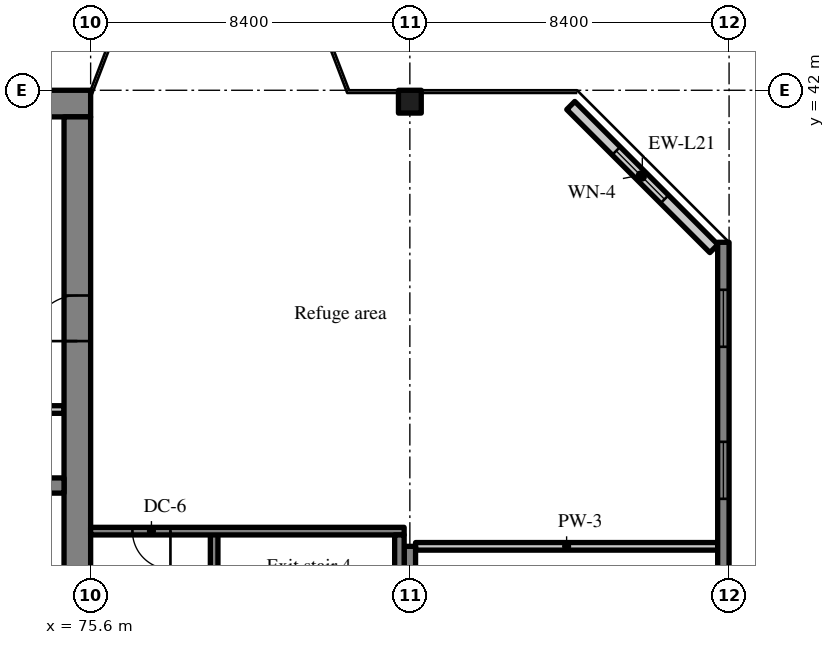
"""IFC4 building model, lengths in metres.
Left out: names, types, materials, properties, quantities, classifications, styles, units other than length and angle.
Written with IfcOpenShell. Run it as: python <this file> out.ifc"""

import sys

from ifc_helpers import new_model, si_unit, direction, frame, frame_2d, origin, origin_2d, place, context, subcontext, project, spatial, rectangle, extrude, source, transform, mapped, element, fill, save


model = new_model("IFC4")
c1 = context("Model", 3, precision=1e-05, world=origin(), true_north=direction((0.0, 1.0)))
c2 = subcontext(c1, "Body", "Model", "MODEL_VIEW")
j1 = project(units=[si_unit("LENGTHUNIT", "METRE"), si_unit("PLANEANGLEUNIT", "RADIAN")], contexts=[c1])
p1 = place(None, origin())
s1 = spatial("IfcSite", under=j1, at=p1, CompositionType="ELEMENT")
p2 = place(p1, origin())
s2 = spatial("IfcBuilding", under=s1, at=p2, CompositionType="ELEMENT")
p3 = place(p2, frame((0.0, 0.0, 155.4)))
s3 = spatial("IfcBuildingStorey", under=s2, at=p3, CompositionType="ELEMENT", Elevation=155.4)
m1 = source(origin(), c2, "Body", "SweptSolid", [
    extrude(rectangle(XDim=50.4, YDim=0.7, at=frame_2d((25.2, 0.0))), origin(), (0.0, 0.0, 1.0), 3.52),
])
p4 = place(p3, frame((25.2, 41.65, 0.0), z_axis=(0.0, 0.0, 1.0), x_axis=(1.0, 0.0, 0.0)))
e1 = element("IfcWall", 1, at=p4, inside=s3, PredefinedType="SHEAR", context=c2, shape_type="MappedRepresentation", body=[
    mapped(m1, transform((0.0, 0.0, 0.0), scale=1.0)),
])
m2 = source(origin(), c2, "Body", "SweptSolid", [
    extrude(rectangle(XDim=18.6, YDim=0.7, at=frame_2d((9.3, 0.0))), origin(), (0.0, 0.0, 1.0), 3.52),
])
p5 = place(p3, frame((75.25, 22.7, 0.0), z_axis=(0.0, 0.0, 1.0), x_axis=(0.0, 1.0, 0.0)))
e2 = element("IfcWall", 2, at=p5, inside=s3, PredefinedType="SHEAR", context=c2, shape_type="MappedRepresentation", body=[
    mapped(m2, transform((0.0, 0.0, 0.0), scale=1.0)),
])
m3 = source(origin(), c2, "Body", "SweptSolid", [
    extrude(rectangle(XDim=1.0, YDim=2.1, at=frame_2d((0.5, 1.05))), frame((0.0, 0.36, 0.0), z_axis=(0.0, -1.0, 0.0), x_axis=(1.0, 0.0, 0.0)), (0.0, 0.0, 1.0), 0.72),
])
p6 = place(p5, frame((2.8, 0.0, 0.0)))
e3 = element("IfcOpeningElement", 3, at=p6, cuts=e2, PredefinedType="OPENING", context=c2, shape_type="MappedRepresentation", body=[
    mapped(m3, transform((0.0, 0.0, 0.0), scale=1.0)),
])
m4 = source(origin(), c2, "Body", "SweptSolid", [
    extrude(rectangle(XDim=1.2, YDim=2.1, at=frame_2d((0.6, 1.05))), frame((0.0, 0.36, 0.0), z_axis=(0.0, -1.0, 0.0), x_axis=(1.0, 0.0, 0.0)), (0.0, 0.0, 1.0), 0.72),
])
p7 = place(p5, frame((12.7, 0.0, 0.0)))
e4 = element("IfcOpeningElement", 4, at=p7, cuts=e2, PredefinedType="OPENING", context=c2, shape_type="MappedRepresentation", body=[
    mapped(m4, transform((0.0, 0.0, 0.0), scale=1.0)),
])
m5 = source(origin(), c2, "Body", "SweptSolid", [
    extrude(rectangle(XDim=7.5, YDim=0.4, at=frame_2d((3.75, 0.0))), origin(), (0.0, 0.0, 1.0), 3.52),
])
p8 = place(p3, frame((67.4, 31.6, 0.0), z_axis=(0.0, 0.0, 1.0), x_axis=(1.0, 0.0, 0.0)))
e5 = element("IfcWall", 5, at=p8, inside=s3, PredefinedType="SHEAR", context=c2, shape_type="MappedRepresentation", body=[
    mapped(m5, transform((0.0, 0.0, 0.0), scale=1.0)),
])
m6 = source(origin(), c2, "Body", "SweptSolid", [
    extrude(rectangle(XDim=1.1, YDim=2.1, at=frame_2d((0.55, 1.05))), frame((0.0, 0.21, 0.0), z_axis=(0.0, -1.0, 0.0), x_axis=(1.0, 0.0, 0.0)), (0.0, 0.0, 1.0), 0.42),
])
p9 = place(p8, frame((5.725, 0.0, 0.0)))
e6 = element("IfcOpeningElement", 6, at=p9, cuts=e5, PredefinedType="OPENING", context=c2, shape_type="MappedRepresentation", body=[
    mapped(m6, transform((0.0, 0.0, 0.0), scale=1.0)),
])
m7 = source(origin(), c2, "Body", "SweptSolid", [
    extrude(rectangle(XDim=8.0, YDim=0.3, at=frame_2d((4.0, 0.0))), origin(), (0.0, 0.0, 1.0), 3.52),
])
p10 = place(p3, frame((84.0, 22.0, 0.0), z_axis=(0.0, 0.0, 1.0), x_axis=(0.0, 1.0, 0.0)))
e7 = element("IfcWall", 7, at=p10, inside=s3, PredefinedType="SHEAR", context=c2, shape_type="MappedRepresentation", body=[
    mapped(m7, transform((0.0, 0.0, 0.0), scale=1.0)),
])
m8 = source(origin(), c2, "Body", "SweptSolid", [
    extrude(rectangle(XDim=16.0, YDim=0.3, at=frame_2d((8.0, 0.0))), origin(), (0.0, 0.0, 1.0), 3.52),
])
p11 = place(p3, frame((92.25, 22.0, 0.0), z_axis=(0.0, 0.0, 1.0), x_axis=(0.0, 1.0, 0.0)))
e8 = element("IfcWall", 8, at=p11, inside=s3, PredefinedType="SHEAR", context=c2, shape_type="MappedRepresentation", body=[
    mapped(m8, transform((0.0, 0.0, 0.0), scale=1.0)),
])
m9 = source(origin(), c2, "Body", "SweptSolid", [
    extrude(rectangle(XDim=1.5, YDim=1.5, at=frame_2d((0.75, 0.75))), frame((0.0, 0.16, 0.0), z_axis=(0.0, -1.0, 0.0), x_axis=(1.0, 0.0, 0.0)), (0.0, 0.0, 1.0), 0.32),
])
p12 = place(p11, frame((1.25, 0.0, 0.9)))
e9 = element("IfcOpeningElement", 9, at=p12, cuts=e8, PredefinedType="OPENING", context=c2, shape_type="MappedRepresentation", body=[
    mapped(m9, transform((0.0, 0.0, 0.0), scale=1.0)),
])
p13 = place(p11, frame((5.25, 0.0, 0.9)))
e10 = element("IfcOpeningElement", 10, at=p13, cuts=e8, PredefinedType="OPENING", context=c2, shape_type="MappedRepresentation", body=[
    mapped(m9, transform((0.0, 0.0, 0.0), scale=1.0)),
])
p14 = place(p11, frame((9.25, 0.0, 0.9)))
e11 = element("IfcOpeningElement", 11, at=p14, cuts=e8, PredefinedType="OPENING", context=c2, shape_type="MappedRepresentation", body=[
    mapped(m9, transform((0.0, 0.0, 0.0), scale=1.0)),
])
p15 = place(p11, frame((13.25, 0.0, 0.9)))
e12 = element("IfcOpeningElement", 12, at=p15, cuts=e8, PredefinedType="OPENING", context=c2, shape_type="MappedRepresentation", body=[
    mapped(m9, transform((0.0, 0.0, 0.0), scale=1.0)),
])
m10 = source(origin(), c2, "Body", "SweptSolid", [
    extrude(rectangle(XDim=0.6, YDim=0.6, at=origin_2d()), origin(), (0.0, 0.0, 1.0), 3.52),
])
p16 = place(p3, frame((84.0, 41.7, 0.0), z_axis=(0.0, 0.0, 1.0), x_axis=(1.0, 0.0, 0.0)))
e13 = element("IfcColumn", 13, at=p16, inside=s3, PredefinedType="COLUMN", context=c2, shape_type="MappedRepresentation", body=[
    mapped(m10, transform((0.0, 0.0, 0.0), scale=1.0)),
])
m11 = source(origin(), c2, "Body", "SweptSolid", [
    extrude(rectangle(XDim=5.326, YDim=0.3, at=frame_2d((2.663, 0.0))), origin(), (0.0, 0.0, 1.0), 3.52),
])
p17 = place(p3, frame((92.0, 37.834, 0.0), z_axis=(0.0, 0.0, 1.0), x_axis=(-0.707083859269, 0.707129702361, 0.0)))
e14 = element("IfcWall", 14, at=p17, inside=s3, PredefinedType="SOLIDWALL", context=c2, shape_type="MappedRepresentation", body=[
    mapped(m11, transform((0.0, 0.0, 0.0), scale=1.0)),
])
m12 = source(origin(), c2, "Body", "SweptSolid", [
    extrude(rectangle(XDim=1.8, YDim=1.5, at=frame_2d((0.9, 0.75))), frame((0.0, 0.16, 0.0), z_axis=(0.0, -1.0, 0.0), x_axis=(1.0, 0.0, 0.0)), (0.0, 0.0, 1.0), 0.32),
])
p18 = place(p17, frame((1.836, 0.0, 0.9)))
e15 = element("IfcOpeningElement", 15, at=p18, cuts=e14, PredefinedType="OPENING", context=c2, shape_type="MappedRepresentation", body=[
    mapped(m12, transform((0.0, 0.0, 0.0), scale=1.0)),
])
m13 = source(origin(), c2, "Body", "SweptSolid", [
    extrude(rectangle(XDim=2.45, YDim=0.2, at=frame_2d((1.225, 0.0))), origin(), (0.0, 0.0, 1.0), 3.52),
])
p19 = place(p3, frame((72.45, 33.6, 0.0), z_axis=(0.0, 0.0, 1.0), x_axis=(1.0, 0.0, 0.0)))
e16 = element("IfcWall", 16, at=p19, inside=s3, PredefinedType="SOLIDWALL", context=c2, shape_type="MappedRepresentation", body=[
    mapped(m13, transform((0.0, 0.0, 0.0), scale=1.0)),
])
m14 = source(origin(), c2, "Body", "SweptSolid", [
    extrude(rectangle(XDim=8.3, YDim=0.2, at=frame_2d((4.15, 0.0))), origin(), (0.0, 0.0, 1.0), 3.52),
])
p20 = place(p3, frame((78.85, 22.1, 0.0), z_axis=(0.0, 0.0, 1.0), x_axis=(0.0, 1.0, 0.0)))
e17 = element("IfcWall", 17, at=p20, inside=s3, PredefinedType="SOLIDWALL", context=c2, shape_type="MappedRepresentation", body=[
    mapped(m14, transform((0.0, 0.0, 0.0), scale=1.0)),
])
m15 = source(origin(), c2, "Body", "SweptSolid", [
    extrude(rectangle(XDim=1.2, YDim=2.1, at=frame_2d((0.6, 1.05))), frame((0.0, 0.11, 0.0), z_axis=(0.0, -1.0, 0.0), x_axis=(1.0, 0.0, 0.0)), (0.0, 0.0, 1.0), 0.22),
])
p21 = place(p20, frame((0.6, 0.0, 0.0)))
e18 = element("IfcOpeningElement", 18, at=p21, cuts=e17, PredefinedType="OPENING", context=c2, shape_type="MappedRepresentation", body=[
    mapped(m15, transform((0.0, 0.0, 0.0), scale=1.0)),
])
m16 = source(origin(), c2, "Body", "SweptSolid", [
    extrude(rectangle(XDim=8.25, YDim=0.2, at=frame_2d((4.125, 0.0))), origin(), (0.0, 0.0, 1.0), 3.52),
])
p22 = place(p3, frame((83.85, 30.4, 0.0), z_axis=(0.0, 0.0, 1.0), x_axis=(-1.0, 0.0, 0.0)))
e19 = element("IfcWall", 19, at=p22, inside=s3, PredefinedType="SOLIDWALL", context=c2, shape_type="MappedRepresentation", body=[
    mapped(m16, transform((0.0, 0.0, 0.0), scale=1.0)),
])
m17 = source(origin(), c2, "Body", "SweptSolid", [
    extrude(rectangle(XDim=1.0, YDim=2.1, at=frame_2d((0.5, 1.05))), frame((0.0, 0.11, 0.0), z_axis=(0.0, -1.0, 0.0), x_axis=(1.0, 0.0, 0.0)), (0.0, 0.0, 1.0), 0.22),
])
p23 = place(p22, frame((6.15, 0.0, 0.0)))
e20 = element("IfcOpeningElement", 20, at=p23, cuts=e19, PredefinedType="OPENING", context=c2, shape_type="MappedRepresentation", body=[
    mapped(m17, transform((0.0, 0.0, 0.0), scale=1.0)),
])
m18 = source(origin(), c2, "Body", "SweptSolid", [
    extrude(rectangle(XDim=8.1, YDim=0.25, at=frame_2d((4.05, 0.0))), origin(), (0.0, 0.0, 1.0), 3.52),
])
p24 = place(p3, frame((83.725, 22.2, 0.0), z_axis=(0.0, 0.0, 1.0), x_axis=(0.0, 1.0, 0.0)))
e21 = element("IfcWall", 21, at=p24, inside=s3, PredefinedType="SOLIDWALL", context=c2, shape_type="MappedRepresentation", body=[
    mapped(m18, transform((0.0, 0.0, 0.0), scale=1.0)),
])
m19 = source(origin(), c2, "Body", "SweptSolid", [
    extrude(rectangle(XDim=7.95, YDim=0.2, at=frame_2d((3.975, 0.0))), origin(), (0.0, 0.0, 1.0), 3.52),
])
p25 = place(p3, frame((84.15, 30.0, 0.0), z_axis=(0.0, 0.0, 1.0), x_axis=(1.0, 0.0, 0.0)))
e22 = element("IfcWall", 22, at=p25, inside=s3, PredefinedType="PARTITIONING", context=c2, shape_type="MappedRepresentation", body=[
    mapped(m19, transform((0.0, 0.0, 0.0), scale=1.0)),
])
m20 = source(origin(), c2, "Body", "SweptSolid", [
    extrude(rectangle(XDim=1.8, YDim=1.5, at=frame_2d((0.9, 0.75))), frame((0.0, 0.03, 0.0), z_axis=(0.0, -1.0, 0.0), x_axis=(1.0, 0.0, 0.0)), (0.0, 0.0, 1.0), 0.06),
])
p26 = place(p18, origin())
e23 = element("IfcWindow", 23, at=p26, inside=s3, PartitioningType="SINGLE_PANEL", PredefinedType="WINDOW", context=c2, shape_type="MappedRepresentation", body=[
    mapped(m20, transform((0.0, 0.0, 0.0), scale=1.0)),
])
fill(e15, e23)
m21 = source(origin(), c2, "Body", "SweptSolid", [
    extrude(rectangle(XDim=1.5, YDim=1.5, at=frame_2d((0.75, 0.75))), frame((0.0, 0.03, 0.0), z_axis=(0.0, -1.0, 0.0), x_axis=(1.0, 0.0, 0.0)), (0.0, 0.0, 1.0), 0.06),
])
p27 = place(p14, origin())
e24 = element("IfcWindow", 24, at=p27, inside=s3, PartitioningType="SINGLE_PANEL", PredefinedType="WINDOW", context=c2, shape_type="MappedRepresentation", body=[
    mapped(m21, transform((0.0, 0.0, 0.0), scale=1.0)),
])
fill(e11, e24)
p28 = place(p15, origin())
e25 = element("IfcWindow", 25, at=p28, inside=s3, PartitioningType="SINGLE_PANEL", PredefinedType="WINDOW", context=c2, shape_type="MappedRepresentation", body=[
    mapped(m21, transform((0.0, 0.0, 0.0), scale=1.0)),
])
fill(e12, e25)
m22 = source(origin(), c2, "Body", "SweptSolid", [
    extrude(rectangle(XDim=1.2, YDim=2.1, at=frame_2d((0.6, 1.05))), frame((0.0, 0.025, 0.0), z_axis=(0.0, -1.0, 0.0), x_axis=(1.0, 0.0, 0.0)), (0.0, 0.0, 1.0), 0.05),
])
p29 = place(p7, origin())
e26 = element("IfcDoor", 26, at=p29, inside=s3, OperationType="SINGLE_SWING_LEFT", PredefinedType="DOOR", context=c2, shape_type="MappedRepresentation", body=[
    mapped(m22, transform((0.0, 0.0, 0.0), scale=1.0)),
])
fill(e4, e26)
m23 = source(origin(), c2, "Body", "SweptSolid", [
    extrude(rectangle(XDim=1.0, YDim=2.1, at=frame_2d((0.5, 1.05))), frame((0.0, 0.025, 0.0), z_axis=(0.0, -1.0, 0.0), x_axis=(1.0, 0.0, 0.0)), (0.0, 0.0, 1.0), 0.05),
])
p30 = place(p23, origin())
e27 = element("IfcDoor", 27, at=p30, inside=s3, OperationType="SINGLE_SWING_LEFT", PredefinedType="DOOR", context=c2, shape_type="MappedRepresentation", body=[
    mapped(m23, transform((0.0, 0.0, 0.0), scale=1.0)),
])
fill(e20, e27)
save(model, sys.argv[1])
